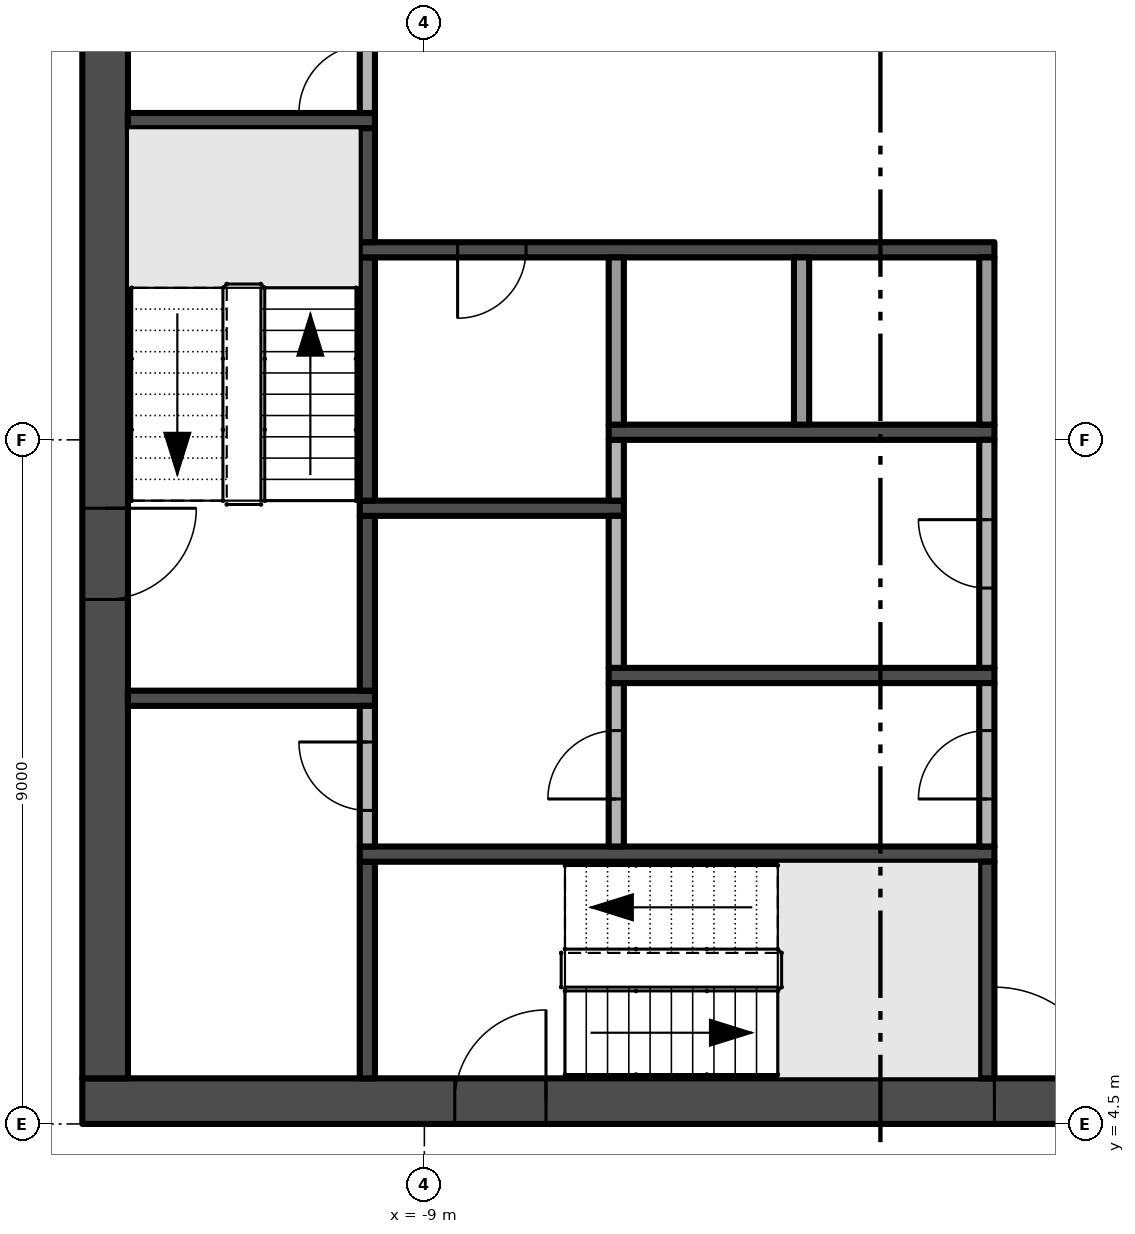
"""IFC4 building model, lengths in metres.
Left out: names, types, materials, properties, quantities, classifications, styles, units other than length and angle.
Written with IfcOpenShell. Run it as: python <this file> out.ifc"""

import sys

from ifc_helpers import new_model, si_unit, direction, frame, frame_2d, origin, place, context, subcontext, project, spatial, rectangle, extrude, element, fill, save


model = new_model("IFC4")
c1 = context("Model", 3, precision=1e-05, world=origin(), true_north=direction((0.0, 1.0)))
c2 = subcontext(c1, "Body", "Model", "MODEL_VIEW")
j1 = project(units=[si_unit("LENGTHUNIT", "METRE"), si_unit("PLANEANGLEUNIT", "RADIAN")], contexts=[c1])
p1 = place(None, origin())
s1 = spatial("IfcSite", under=j1, at=p1, CompositionType="ELEMENT")
p2 = place(p1, origin())
s2 = spatial("IfcBuilding", under=s1, at=p2, CompositionType="ELEMENT")
p3 = place(p2, frame((0.0, 0.0, 218.6)))
s3 = spatial("IfcBuildingStorey", under=s2, at=p3, CompositionType="ELEMENT", Elevation=218.6)
p4 = place(p3, frame((-13.5, 4.8, -0.3), z_axis=(0.0, 0.0, 1.0), x_axis=(1.0, 0.0, 0.0)))
e1 = element("IfcWall", 1, at=p4, inside=s3, PredefinedType="SHEAR", context=c2, shape_type="SweptSolid", body=[
    extrude(rectangle(XDim=27.0, YDim=0.6, at=frame_2d((13.5, 0.0))), origin(), (0.0, 0.0, 1.0), 3.8),
])
p5 = place(p4, frame((12.0, 0.0, 0.3)))
e2 = element("IfcOpeningElement", 2, at=p5, cuts=e1, PredefinedType="OPENING", context=c2, shape_type="SweptSolid", body=[
    extrude(rectangle(XDim=3.0, YDim=2.4, at=frame_2d((1.5, 1.2))), frame((0.0, 0.31, 0.0), z_axis=(0.0, -1.0, 0.0), x_axis=(1.0, 0.0, 0.0)), (0.0, 0.0, 1.0), 0.62),
])
p6 = place(p4, frame((4.9, 0.0, 0.3)))
e3 = element("IfcOpeningElement", 3, at=p6, cuts=e1, PredefinedType="OPENING", context=c2, shape_type="SweptSolid", body=[
    extrude(rectangle(XDim=1.2, YDim=2.2, at=frame_2d((0.6, 1.1))), frame((0.0, 0.31, 0.0), z_axis=(0.0, -1.0, 0.0), x_axis=(1.0, 0.0, 0.0)), (0.0, 0.0, 1.0), 0.62),
])
p7 = place(p4, frame((20.75, 0.0, 0.3)))
e4 = element("IfcOpeningElement", 4, at=p7, cuts=e1, PredefinedType="OPENING", context=c2, shape_type="SweptSolid", body=[
    extrude(rectangle(XDim=1.5, YDim=2.2, at=frame_2d((0.75, 1.1))), frame((0.0, 0.31, 0.0), z_axis=(0.0, -1.0, 0.0), x_axis=(1.0, 0.0, 0.0)), (0.0, 0.0, 1.0), 0.62),
])
p8 = place(p4, frame((17.4, 0.0, 0.3)))
e5 = element("IfcOpeningElement", 5, at=p8, cuts=e1, PredefinedType="OPENING", context=c2, shape_type="SweptSolid", body=[
    extrude(rectangle(XDim=1.2, YDim=2.2, at=frame_2d((0.6, 1.1))), frame((0.0, 0.31, 0.0), z_axis=(0.0, -1.0, 0.0), x_axis=(1.0, 0.0, 0.0)), (0.0, 0.0, 1.0), 0.62),
])
p9 = place(p3, frame((-13.2, 21.9, -0.3), z_axis=(0.0, 0.0, 1.0), x_axis=(0.0, -1.0, 0.0)))
e6 = element("IfcWall", 6, at=p9, inside=s3, PredefinedType="SHEAR", context=c2, shape_type="SweptSolid", body=[
    extrude(rectangle(XDim=16.8, YDim=0.6, at=frame_2d((8.4, 0.0))), origin(), (0.0, 0.0, 1.0), 3.8),
])
p10 = place(p9, frame((9.3, 0.0, 0.3)))
e7 = element("IfcOpeningElement", 7, at=p10, cuts=e6, PredefinedType="OPENING", context=c2, shape_type="SweptSolid", body=[
    extrude(rectangle(XDim=1.2, YDim=2.2, at=frame_2d((0.6, 1.1))), frame((0.0, 0.31, 0.0), z_axis=(0.0, -1.0, 0.0), x_axis=(1.0, 0.0, 0.0)), (0.0, 0.0, 1.0), 0.62),
])
for number, where, z_axis, x_axis in (
    (8, (-12.9, 10.1, 0.0), (0.0, 0.0, 1.0), (1.0, 0.0, 0.0)),
    (9, (-12.9, 17.7, 0.0), (0.0, 0.0, 1.0), (1.0, 0.0, 0.0)),
):
    element("IfcWall", number, at=place(p3, frame(where, z_axis=z_axis, x_axis=x_axis)), inside=s3, PredefinedType="SHEAR", context=c2, shape_type="SweptSolid", body=[
        extrude(rectangle(XDim=3.25, YDim=0.2, at=frame_2d((1.625, 0.0))), origin(), (0.0, 0.0, 1.0), 3.5),
    ])
p11 = place(p3, frame((-9.75, 5.1, 0.0), z_axis=(0.0, 0.0, 1.0), x_axis=(0.0, 1.0, 0.0)))
e10 = element("IfcWall", 10, at=p11, inside=s3, PredefinedType="SHEAR", context=c2, shape_type="SweptSolid", body=[
    extrude(rectangle(XDim=2.85, YDim=0.2, at=frame_2d((1.425, 0.0))), origin(), (0.0, 0.0, 1.0), 3.5),
])
p12 = place(p3, frame((-9.85, 8.05, 0.0), z_axis=(0.0, 0.0, 1.0), x_axis=(1.0, 0.0, 0.0)))
e11 = element("IfcWall", 11, at=p12, inside=s3, PredefinedType="SHEAR", context=c2, shape_type="SweptSolid", body=[
    extrude(rectangle(XDim=8.35, YDim=0.2, at=frame_2d((4.175, 0.0))), origin(), (0.0, 0.0, 1.0), 3.5),
])
p13 = place(p3, frame((-9.75, 8.15, 0.0), z_axis=(0.0, 0.0, 1.0), x_axis=(0.0, 1.0, 0.0)))
e12 = element("IfcWall", 12, at=p13, inside=s3, PredefinedType="PARTITIONING", context=c2, shape_type="SweptSolid", body=[
    extrude(rectangle(XDim=1.85, YDim=0.2, at=frame_2d((0.925, 0.0))), origin(), (0.0, 0.0, 1.0), 3.5),
])
p14 = place(p13, frame((0.475, 0.0, 0.0)))
e13 = element("IfcOpeningElement", 13, at=p14, cuts=e12, PredefinedType="OPENING", context=c2, shape_type="SweptSolid", body=[
    extrude(rectangle(XDim=0.9, YDim=2.1, at=frame_2d((0.45, 1.05))), frame((0.0, 0.11, 0.0), z_axis=(0.0, -1.0, 0.0), x_axis=(1.0, 0.0, 0.0)), (0.0, 0.0, 1.0), 0.22),
])
p15 = place(p3, frame((-9.75, 10.2, 0.0), z_axis=(0.0, 0.0, 1.0), x_axis=(0.0, 1.0, 0.0)))
e14 = element("IfcWall", 14, at=p15, inside=s3, PredefinedType="SHEAR", context=c2, shape_type="SweptSolid", body=[
    extrude(rectangle(XDim=2.3, YDim=0.2, at=frame_2d((1.15, 0.0))), origin(), (0.0, 0.0, 1.0), 3.5),
])
p16 = place(p3, frame((-9.85, 12.6, 0.0), z_axis=(0.0, 0.0, 1.0), x_axis=(1.0, 0.0, 0.0)))
e15 = element("IfcWall", 15, at=p16, inside=s3, PredefinedType="SHEAR", context=c2, shape_type="SweptSolid", body=[
    extrude(rectangle(XDim=3.475, YDim=0.2, at=frame_2d((1.738, 0.0))), origin(), (0.0, 0.0, 1.0), 3.5),
])
p17 = place(p3, frame((-9.75, 12.7, 0.0), z_axis=(0.0, 0.0, 1.0), x_axis=(0.0, 1.0, 0.0)))
e16 = element("IfcWall", 16, at=p17, inside=s3, PredefinedType="SHEAR", context=c2, shape_type="SweptSolid", body=[
    extrude(rectangle(XDim=3.2, YDim=0.2, at=frame_2d((1.6, 0.0))), origin(), (0.0, 0.0, 1.0), 3.5),
])
p18 = place(p3, frame((-1.5, 16.0, 0.0), z_axis=(0.0, 0.0, 1.0), x_axis=(-1.0, 0.0, 0.0)))
e17 = element("IfcWall", 17, at=p18, inside=s3, PredefinedType="SHEAR", context=c2, shape_type="SweptSolid", body=[
    extrude(rectangle(XDim=8.35, YDim=0.2, at=frame_2d((4.175, 0.0))), origin(), (0.0, 0.0, 1.0), 3.5),
])
p19 = place(p18, frame((6.162, 0.0, 0.0)))
e18 = element("IfcOpeningElement", 18, at=p19, cuts=e17, PredefinedType="OPENING", context=c2, shape_type="SweptSolid", body=[
    extrude(rectangle(XDim=0.9, YDim=2.1, at=frame_2d((0.45, 1.05))), frame((0.0, 0.11, 0.0), z_axis=(0.0, -1.0, 0.0), x_axis=(1.0, 0.0, 0.0)), (0.0, 0.0, 1.0), 0.22),
])
p20 = place(p3, frame((-9.75, 16.1, 0.0), z_axis=(0.0, 0.0, 1.0), x_axis=(0.0, 1.0, 0.0)))
e19 = element("IfcWall", 19, at=p20, inside=s3, PredefinedType="SHEAR", context=c2, shape_type="SweptSolid", body=[
    extrude(rectangle(XDim=1.5, YDim=0.2, at=frame_2d((0.75, 0.0))), origin(), (0.0, 0.0, 1.0), 3.5),
])
p21 = place(p3, frame((-9.75, 17.8, 0.0), z_axis=(0.0, 0.0, 1.0), x_axis=(0.0, 1.0, 0.0)))
e20 = element("IfcWall", 20, at=p21, inside=s3, PredefinedType="PARTITIONING", context=c2, shape_type="SweptSolid", body=[
    extrude(rectangle(XDim=1.4, YDim=0.2, at=frame_2d((0.7, 0.0))), origin(), (0.0, 0.0, 1.0), 3.5),
])
p22 = place(p21, origin())
e21 = element("IfcOpeningElement", 21, at=p22, cuts=e20, PredefinedType="OPENING", context=c2, shape_type="SweptSolid", body=[
    extrude(rectangle(XDim=0.9, YDim=2.1, at=frame_2d((0.45, 1.05))), frame((0.0, 0.11, 0.0), z_axis=(0.0, -1.0, 0.0), x_axis=(1.0, 0.0, 0.0)), (0.0, 0.0, 1.0), 0.22),
])
p23 = place(p3, frame((-6.475, 8.15, 0.0), z_axis=(0.0, 0.0, 1.0), x_axis=(0.0, 1.0, 0.0)))
e22 = element("IfcWall", 22, at=p23, inside=s3, PredefinedType="PARTITIONING", context=c2, shape_type="SweptSolid", body=[
    extrude(rectangle(XDim=2.15, YDim=0.2, at=frame_2d((1.075, 0.0))), origin(), (0.0, 0.0, 1.0), 3.5),
])
p24 = place(p23, frame((0.625, 0.0, 0.0)))
e23 = element("IfcOpeningElement", 23, at=p24, cuts=e22, PredefinedType="OPENING", context=c2, shape_type="SweptSolid", body=[
    extrude(rectangle(XDim=0.9, YDim=2.1, at=frame_2d((0.45, 1.05))), frame((0.0, 0.11, 0.0), z_axis=(0.0, -1.0, 0.0), x_axis=(1.0, 0.0, 0.0)), (0.0, 0.0, 1.0), 0.22),
])
p25 = place(p3, frame((-6.575, 10.4, 0.0), z_axis=(0.0, 0.0, 1.0), x_axis=(1.0, 0.0, 0.0)))
e24 = element("IfcWall", 24, at=p25, inside=s3, PredefinedType="SHEAR", context=c2, shape_type="SweptSolid", body=[
    extrude(rectangle(XDim=5.075, YDim=0.2, at=frame_2d((2.538, 0.0))), origin(), (0.0, 0.0, 1.0), 3.5),
])
p26 = place(p3, frame((-6.475, 10.5, 0.0), z_axis=(0.0, 0.0, 1.0), x_axis=(0.0, 1.0, 0.0)))
e25 = element("IfcWall", 25, at=p26, inside=s3, PredefinedType="PARTITIONING", context=c2, shape_type="SweptSolid", body=[
    extrude(rectangle(XDim=2.0, YDim=0.2, at=frame_2d((1.0, 0.0))), origin(), (0.0, 0.0, 1.0), 3.5),
])
p27 = place(p3, frame((-6.475, 12.7, 0.0), z_axis=(0.0, 0.0, 1.0), x_axis=(0.0, 1.0, 0.0)))
e26 = element("IfcWall", 26, at=p27, inside=s3, PredefinedType="PARTITIONING", context=c2, shape_type="SweptSolid", body=[
    extrude(rectangle(XDim=0.8, YDim=0.2, at=frame_2d((0.4, 0.0))), origin(), (0.0, 0.0, 1.0), 3.5),
])
p28 = place(p3, frame((-6.575, 13.6, 0.0), z_axis=(0.0, 0.0, 1.0), x_axis=(1.0, 0.0, 0.0)))
e27 = element("IfcWall", 27, at=p28, inside=s3, PredefinedType="SHEAR", context=c2, shape_type="SweptSolid", body=[
    extrude(rectangle(XDim=5.075, YDim=0.2, at=frame_2d((2.538, 0.0))), origin(), (0.0, 0.0, 1.0), 3.5),
])
for number, where, z_axis, x_axis in (
    (28, (-6.475, 13.7, 0.0), (0.0, 0.0, 1.0), (0.0, 1.0, 0.0)),
    (29, (-4.037, 13.7, 0.0), (0.0, 0.0, 1.0), (0.0, 1.0, 0.0)),
):
    element("IfcWall", number, at=place(p3, frame(where, z_axis=z_axis, x_axis=x_axis)), inside=s3, PredefinedType="PARTITIONING", context=c2, shape_type="SweptSolid", body=[
        extrude(rectangle(XDim=2.2, YDim=0.2, at=frame_2d((1.1, 0.0))), origin(), (0.0, 0.0, 1.0), 3.5),
    ])
p29 = place(p3, frame((-1.6, 5.1, 0.0), z_axis=(0.0, 0.0, 1.0), x_axis=(0.0, 1.0, 0.0)))
e30 = element("IfcWall", 30, at=p29, inside=s3, PredefinedType="SHEAR", context=c2, shape_type="SweptSolid", body=[
    extrude(rectangle(XDim=2.85, YDim=0.2, at=frame_2d((1.425, 0.0))), origin(), (0.0, 0.0, 1.0), 3.5),
])
p30 = place(p3, frame((-1.6, 8.15, 0.0), z_axis=(0.0, 0.0, 1.0), x_axis=(0.0, 1.0, 0.0)))
e31 = element("IfcWall", 31, at=p30, inside=s3, PredefinedType="PARTITIONING", context=c2, shape_type="SweptSolid", body=[
    extrude(rectangle(XDim=2.15, YDim=0.2, at=frame_2d((1.075, 0.0))), origin(), (0.0, 0.0, 1.0), 3.5),
])
p31 = place(p30, frame((0.625, 0.0, 0.0)))
e32 = element("IfcOpeningElement", 32, at=p31, cuts=e31, PredefinedType="OPENING", context=c2, shape_type="SweptSolid", body=[
    extrude(rectangle(XDim=0.9, YDim=2.1, at=frame_2d((0.45, 1.05))), frame((0.0, 0.11, 0.0), z_axis=(0.0, -1.0, 0.0), x_axis=(1.0, 0.0, 0.0)), (0.0, 0.0, 1.0), 0.22),
])
p32 = place(p3, frame((-1.6, 10.5, 0.0), z_axis=(0.0, 0.0, 1.0), x_axis=(0.0, 1.0, 0.0)))
e33 = element("IfcWall", 33, at=p32, inside=s3, PredefinedType="PARTITIONING", context=c2, shape_type="SweptSolid", body=[
    extrude(rectangle(XDim=3.0, YDim=0.2, at=frame_2d((1.5, 0.0))), origin(), (0.0, 0.0, 1.0), 3.5),
])
p33 = place(p32, frame((1.05, 0.0, 0.0)))
e34 = element("IfcOpeningElement", 34, at=p33, cuts=e33, PredefinedType="OPENING", context=c2, shape_type="SweptSolid", body=[
    extrude(rectangle(XDim=0.9, YDim=2.1, at=frame_2d((0.45, 1.05))), frame((0.0, 0.11, 0.0), z_axis=(0.0, -1.0, 0.0), x_axis=(1.0, 0.0, 0.0)), (0.0, 0.0, 1.0), 0.22),
])
p34 = place(p3, frame((-1.6, 13.7, 0.0), z_axis=(0.0, 0.0, 1.0), x_axis=(0.0, 1.0, 0.0)))
e35 = element("IfcWall", 35, at=p34, inside=s3, PredefinedType="PARTITIONING", context=c2, shape_type="SweptSolid", body=[
    extrude(rectangle(XDim=2.2, YDim=0.2, at=frame_2d((1.1, 0.0))), origin(), (0.0, 0.0, 1.0), 3.5),
])
p35 = place(p5, frame((3.0, 0.0, 0.0), z_axis=(0.0, 0.0, 1.0), x_axis=(-1.0, 0.0, 0.0)))
e36 = element("IfcDoor", 36, at=p35, inside=s3, OperationType="DOUBLE_DOOR_SINGLE_SWING", PredefinedType="DOOR", context=c2, shape_type="SweptSolid", body=[
    extrude(rectangle(XDim=3.0, YDim=2.4, at=frame_2d((1.5, 1.2))), frame((0.0, 0.025, 0.0), z_axis=(0.0, -1.0, 0.0), x_axis=(1.0, 0.0, 0.0)), (0.0, 0.0, 1.0), 0.05),
])
fill(e2, e36)
p36 = place(p10, frame((1.2, 0.0, 0.0), z_axis=(0.0, 0.0, 1.0), x_axis=(-1.0, 0.0, 0.0)))
e37 = element("IfcDoor", 37, at=p36, inside=s3, OperationType="SINGLE_SWING_RIGHT", PredefinedType="DOOR", context=c2, shape_type="SweptSolid", body=[
    extrude(rectangle(XDim=1.2, YDim=2.2, at=frame_2d((0.6, 1.1))), frame((0.0, 0.025, 0.0), z_axis=(0.0, -1.0, 0.0), x_axis=(1.0, 0.0, 0.0)), (0.0, 0.0, 1.0), 0.05),
])
fill(e7, e37)
p37 = place(p6, frame((1.2, 0.0, 0.0), z_axis=(0.0, 0.0, 1.0), x_axis=(-1.0, 0.0, 0.0)))
e38 = element("IfcDoor", 38, at=p37, inside=s3, OperationType="SINGLE_SWING_LEFT", PredefinedType="DOOR", context=c2, shape_type="SweptSolid", body=[
    extrude(rectangle(XDim=1.2, YDim=2.2, at=frame_2d((0.6, 1.1))), frame((0.0, 0.025, 0.0), z_axis=(0.0, -1.0, 0.0), x_axis=(1.0, 0.0, 0.0)), (0.0, 0.0, 1.0), 0.05),
])
fill(e3, e38)
p38 = place(p19, origin())
e39 = element("IfcDoor", 39, at=p38, inside=s3, OperationType="SINGLE_SWING_RIGHT", PredefinedType="DOOR", context=c2, shape_type="SweptSolid", body=[
    extrude(rectangle(XDim=0.9, YDim=2.1, at=frame_2d((0.45, 1.05))), frame((0.0, 0.025, 0.0), z_axis=(0.0, -1.0, 0.0), x_axis=(1.0, 0.0, 0.0)), (0.0, 0.0, 1.0), 0.05),
])
fill(e18, e39)
p39 = place(p31, origin())
e40 = element("IfcDoor", 40, at=p39, inside=s3, OperationType="SINGLE_SWING_LEFT", PredefinedType="DOOR", context=c2, shape_type="SweptSolid", body=[
    extrude(rectangle(XDim=0.9, YDim=2.1, at=frame_2d((0.45, 1.05))), frame((0.0, 0.025, 0.0), z_axis=(0.0, -1.0, 0.0), x_axis=(1.0, 0.0, 0.0)), (0.0, 0.0, 1.0), 0.05),
])
fill(e32, e40)
p40 = place(p33, origin())
e41 = element("IfcDoor", 41, at=p40, inside=s3, OperationType="SINGLE_SWING_RIGHT", PredefinedType="DOOR", context=c2, shape_type="SweptSolid", body=[
    extrude(rectangle(XDim=0.9, YDim=2.1, at=frame_2d((0.45, 1.05))), frame((0.0, 0.025, 0.0), z_axis=(0.0, -1.0, 0.0), x_axis=(1.0, 0.0, 0.0)), (0.0, 0.0, 1.0), 0.05),
])
fill(e34, e41)
p41 = place(p22, origin())
e42 = element("IfcDoor", 42, at=p41, inside=s3, OperationType="SINGLE_SWING_LEFT", PredefinedType="DOOR", context=c2, shape_type="SweptSolid", body=[
    extrude(rectangle(XDim=0.9, YDim=2.1, at=frame_2d((0.45, 1.05))), frame((0.0, 0.025, 0.0), z_axis=(0.0, -1.0, 0.0), x_axis=(1.0, 0.0, 0.0)), (0.0, 0.0, 1.0), 0.05),
])
fill(e21, e42)
p42 = place(p24, origin())
e43 = element("IfcDoor", 43, at=p42, inside=s3, OperationType="SINGLE_SWING_LEFT", PredefinedType="DOOR", context=c2, shape_type="SweptSolid", body=[
    extrude(rectangle(XDim=0.9, YDim=2.1, at=frame_2d((0.45, 1.05))), frame((0.0, 0.025, 0.0), z_axis=(0.0, -1.0, 0.0), x_axis=(1.0, 0.0, 0.0)), (0.0, 0.0, 1.0), 0.05),
])
fill(e23, e43)
p43 = place(p14, origin())
e44 = element("IfcDoor", 44, at=p43, inside=s3, OperationType="SINGLE_SWING_RIGHT", PredefinedType="DOOR", context=c2, shape_type="SweptSolid", body=[
    extrude(rectangle(XDim=0.9, YDim=2.1, at=frame_2d((0.45, 1.05))), frame((0.0, 0.025, 0.0), z_axis=(0.0, -1.0, 0.0), x_axis=(1.0, 0.0, 0.0)), (0.0, 0.0, 1.0), 0.05),
])
fill(e13, e44)
save(model, sys.argv[1])
